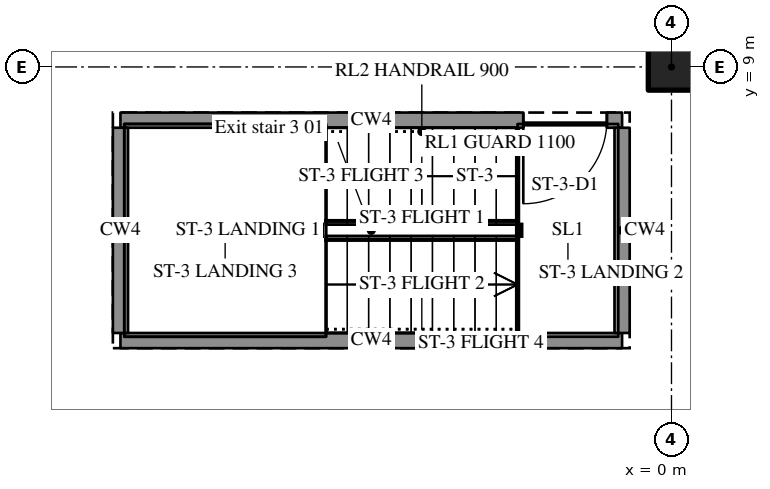
"""IFC4 building model, lengths in metres.
Left out: names, types, materials, properties, quantities, classifications, styles, units other than length and angle.
Written with IfcOpenShell. Run it as: python <this file> out.ifc"""

import sys

from ifc_helpers import new_model, si_unit, direction, frame, frame_2d, origin, origin_2d, place, context, subcontext, project, spatial, rectangle, hollow_circle, extrude, element, fill, save


model = new_model("IFC4")
c1 = context("Model", 3, precision=1e-05, world=origin(), true_north=direction((0.0, 1.0)))
c2 = subcontext(c1, "Body", "Model", "MODEL_VIEW")
j1 = project(units=[si_unit("LENGTHUNIT", "METRE"), si_unit("PLANEANGLEUNIT", "RADIAN")], contexts=[c1])
p1 = place(None, origin())
s1 = spatial("IfcSite", under=j1, at=p1, CompositionType="ELEMENT")
p2 = place(p1, origin())
s2 = spatial("IfcBuilding", under=s1, at=p2, CompositionType="ELEMENT")
p3 = place(p2, frame((0.0, 0.0, 210.0)))
s3 = spatial("IfcBuildingStorey", under=s2, at=p3, CompositionType="ELEMENT", Elevation=210.0)
p4 = place(p3, frame((0.0, 9.0, 0.0), z_axis=(0.0, 0.0, 1.0), x_axis=(1.0, 0.0, 0.0)))
e1 = element("IfcColumn", 1, at=p4, inside=s3, PredefinedType="COLUMN", context=c2, shape_type="SweptSolid", body=[
    extrude(hollow_circle(Radius=0.305, WallThickness=0.03, at=origin_2d()), origin(), (0.0, 0.0, 1.0), 7.2),
])
p5 = place(p3, frame((-7.25, 5.4, 0.0), z_axis=(0.0, 0.0, 1.0), x_axis=(1.0, 0.0, 0.0)))
e2 = element("IfcWall", 2, at=p5, inside=s3, PredefinedType="SHEAR", context=c2, shape_type="SweptSolid", body=[
    extrude(rectangle(XDim=6.6, YDim=0.2, at=frame_2d((3.3, 0.0))), origin(), (0.0, 0.0, 1.0), 7.2),
])
p6 = place(p3, frame((-0.65, 8.3, 0.0), z_axis=(0.0, 0.0, 1.0), x_axis=(-1.0, 0.0, 0.0)))
e3 = element("IfcWall", 3, at=p6, inside=s3, PredefinedType="SHEAR", context=c2, shape_type="SweptSolid", body=[
    extrude(rectangle(XDim=6.6, YDim=0.2, at=frame_2d((3.3, 0.0))), origin(), (0.0, 0.0, 1.0), 7.2),
])
p7 = place(p6, frame((0.2, 0.0, 0.0)))
e4 = element("IfcOpeningElement", 4, at=p7, cuts=e3, PredefinedType="OPENING", context=c2, shape_type="SweptSolid", body=[
    extrude(rectangle(XDim=1.1, YDim=2.1, at=frame_2d((0.55, 1.05))), frame((0.0, 0.11, 0.0), z_axis=(0.0, -1.0, 0.0), x_axis=(1.0, 0.0, 0.0)), (0.0, 0.0, 1.0), 0.22),
])
for number, where, z_axis, x_axis in (
    (5, (-7.25, 5.5, 0.0), (0.0, 0.0, 1.0), (0.0, 1.0, 0.0)),
    (6, (-0.65, 5.5, 0.0), (0.0, 0.0, 1.0), (0.0, 1.0, 0.0)),
):
    element("IfcWall", number, at=place(p3, frame(where, z_axis=z_axis, x_axis=x_axis)), inside=s3, PredefinedType="SHEAR", context=c2, shape_type="SweptSolid", body=[
        extrude(rectangle(XDim=2.7, YDim=0.2, at=frame_2d((1.35, 0.0))), origin(), (0.0, 0.0, 1.0), 7.2),
    ])
p8 = place(p7, origin())
e7 = element("IfcDoor", 7, at=p8, inside=s3, OperationType="SINGLE_SWING_RIGHT", PredefinedType="DOOR", context=c2, shape_type="SweptSolid", body=[
    extrude(rectangle(XDim=1.1, YDim=2.1, at=frame_2d((0.55, 1.05))), frame((0.0, 0.025, 0.0), z_axis=(0.0, -1.0, 0.0), x_axis=(1.0, 0.0, 0.0)), (0.0, 0.0, 1.0), 0.05),
])
fill(e4, e7)
save(model, sys.argv[1])
